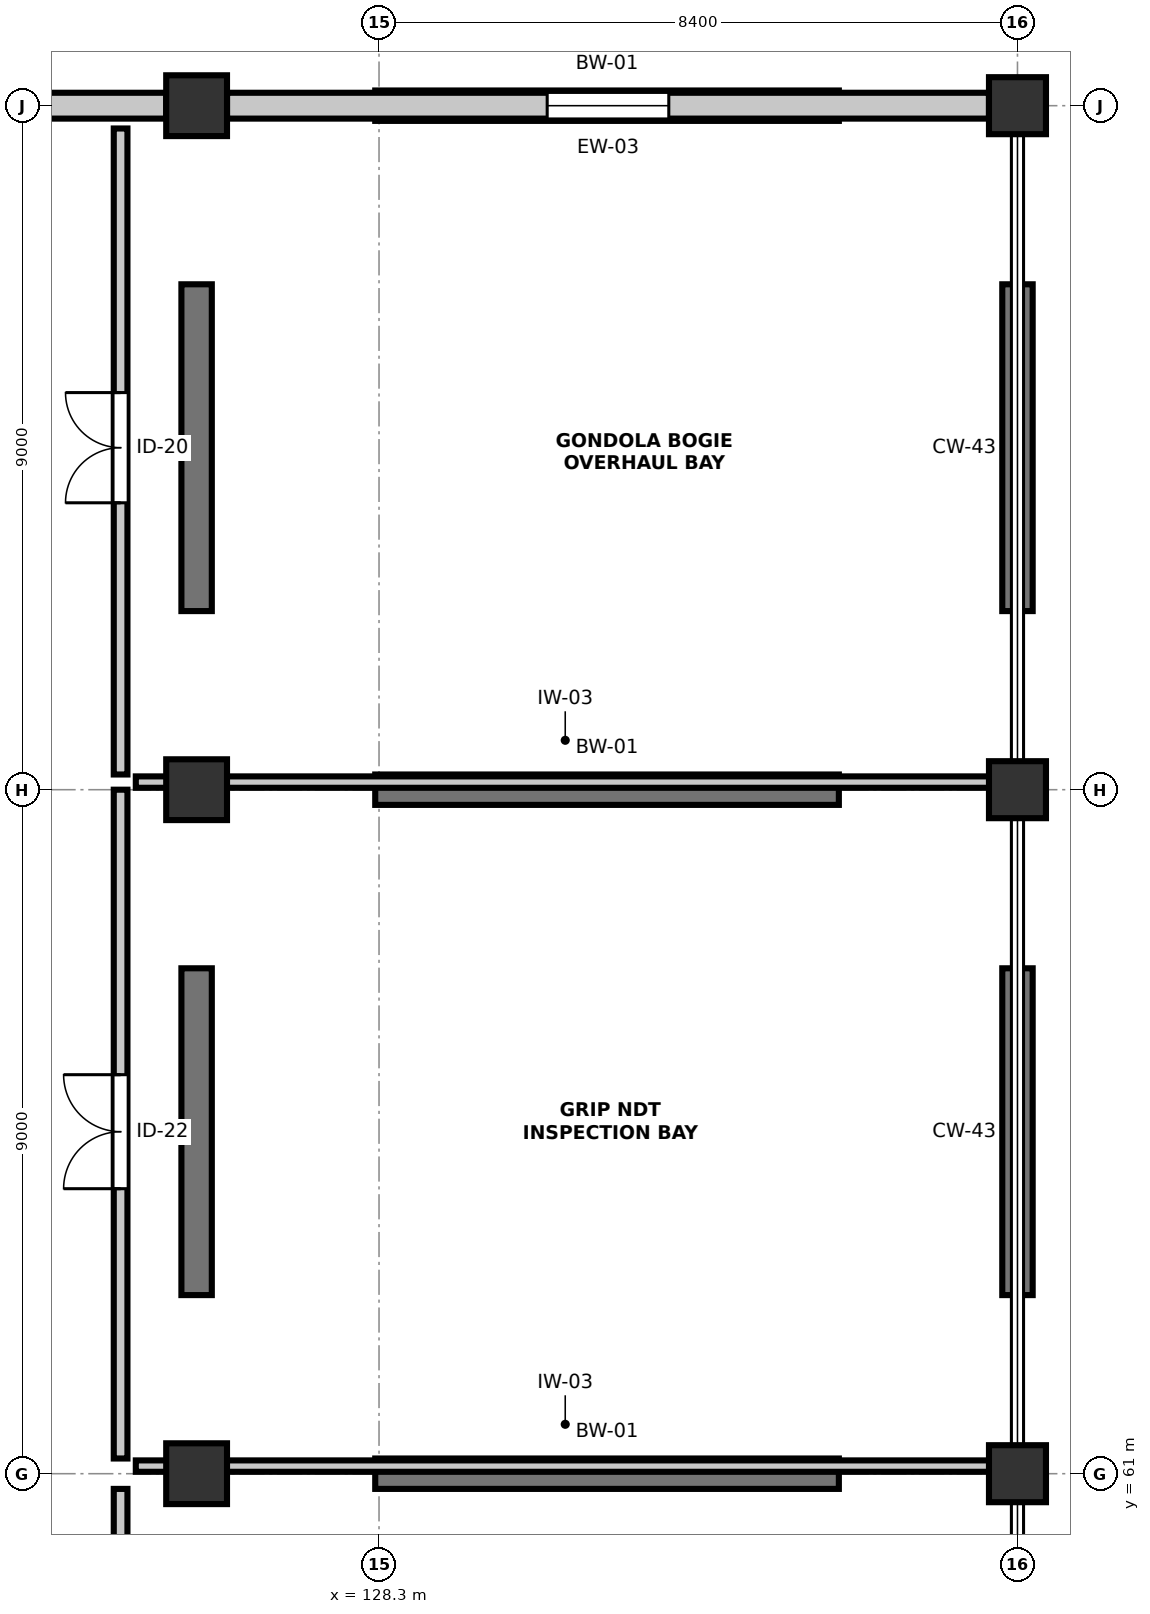
"""IFC4 building model, lengths in metres.
Left out: names, types, materials, properties, quantities, classifications, styles, units other than length and angle.
Written with IfcOpenShell. Run it as: python <this file> out.ifc"""

import sys

from ifc_helpers import new_model, si_unit, direction, frame, frame_2d, origin, origin_2d, place, context, subcontext, project, spatial, rectangle, extrude, element, fill, save


model = new_model("IFC4")
c1 = context("Model", 3, precision=1e-05, world=origin(), true_north=direction((0.0, 1.0)))
c2 = subcontext(c1, "Body", "Model", "MODEL_VIEW")
j1 = project(units=[si_unit("LENGTHUNIT", "METRE"), si_unit("PLANEANGLEUNIT", "RADIAN")], contexts=[c1])
p1 = place(None, origin())
s1 = spatial("IfcSite", under=j1, at=p1, CompositionType="ELEMENT")
p2 = place(p1, origin())
s2 = spatial("IfcBuilding", under=s1, at=p2, CompositionType="ELEMENT")
p3 = place(p2, frame((0.0, 0.0, 9.6)))
s3 = spatial("IfcBuildingStorey", under=s2, at=p3, CompositionType="ELEMENT", Elevation=9.6)
for number, where, z_axis, x_axis in (
    (1, (125.9, 61.0, 0.0), (0.0, 0.0, 1.0), (1.0, 0.0, 0.0)),
    (2, (125.9, 70.0, 0.0), (0.0, 0.0, 1.0), (1.0, 0.0, 0.0)),
    (3, (125.9, 79.0, 0.0), (0.0, 0.0, 1.0), (1.0, 0.0, 0.0)),
):
    element("IfcColumn", number, at=place(p3, frame(where, z_axis=z_axis, x_axis=x_axis)), inside=s3, PredefinedType="COLUMN", context=c2, shape_type="SweptSolid", body=[
        extrude(rectangle(XDim=0.8, YDim=0.8, at=origin_2d()), origin(), (0.0, 0.0, 1.0), 4.8),
    ])
for number, where, z_axis, x_axis in (
    (4, (136.7, 61.0, 0.0), (0.0, 0.0, 1.0), (1.0, 0.0, 0.0)),
    (5, (136.7, 70.0, 0.0), (0.0, 0.0, 1.0), (1.0, 0.0, 0.0)),
    (6, (136.7, 79.0, 0.0), (0.0, 0.0, 1.0), (1.0, 0.0, 0.0)),
):
    element("IfcColumn", number, at=place(p3, frame(where, z_axis=z_axis, x_axis=x_axis)), inside=s3, PredefinedType="COLUMN", context=c2, shape_type="SweptSolid", body=[
        extrude(rectangle(XDim=0.75, YDim=0.75, at=origin_2d()), origin(), (0.0, 0.0, 1.0), 4.8),
    ])
for number, where, z_axis, x_axis in (
    (7, (128.25, 61.0, -2.1), (0.0, 0.0, 1.0), (1.0, 0.0, 0.0)),
    (8, (128.25, 70.0, -2.1), (0.0, 0.0, 1.0), (1.0, 0.0, 0.0)),
    (9, (128.25, 79.0, -2.1), (0.0, 0.0, 1.0), (1.0, 0.0, 0.0)),
):
    element("IfcWall", number, at=place(p3, frame(where, z_axis=z_axis, x_axis=x_axis)), inside=s3, PredefinedType="SOLIDWALL", context=c2, shape_type="SweptSolid", body=[
        extrude(rectangle(XDim=6.1, YDim=0.4, at=frame_2d((3.05, 0.0))), origin(), (0.0, 0.0, 1.0), 1.85),
    ])
for number, where, z_axis, x_axis in (
    (10, (125.9, 63.35, -2.1), (0.0, 0.0, 1.0), (0.0, 1.0, 0.0)),
    (11, (125.9, 72.35, -2.1), (0.0, 0.0, 1.0), (0.0, 1.0, 0.0)),
    (12, (136.7, 63.35, -2.1), (0.0, 0.0, 1.0), (0.0, 1.0, 0.0)),
    (13, (136.7, 72.35, -2.1), (0.0, 0.0, 1.0), (0.0, 1.0, 0.0)),
):
    element("IfcWall", number, at=place(p3, frame(where, z_axis=z_axis, x_axis=x_axis)), inside=s3, PredefinedType="SOLIDWALL", context=c2, shape_type="SweptSolid", body=[
        extrude(rectangle(XDim=4.3, YDim=0.4, at=frame_2d((2.15, 0.0))), origin(), (0.0, 0.0, 1.0), 1.85),
    ])
p4 = place(p2, frame((0.0, 0.0, 14.4)))
s4 = spatial("IfcBuildingStorey", under=s2, at=p4, CompositionType="ELEMENT", Elevation=14.4)
p5 = place(p4, frame((129.4, 79.655, -7.2), z_axis=(0.0, 0.0, 1.0), x_axis=(1.0, 0.0, 0.0)))
e14 = element("IfcWall", 14, at=p5, inside=s4, PredefinedType="SOLIDWALL", context=c2, shape_type="SweptSolid", body=[
    extrude(rectangle(XDim=6.2, YDim=0.4, at=frame_2d((3.1, 0.0))), origin(), (0.0, 0.0, 1.0), 6.98),
])
p6 = place(p3, frame((125.5, 79.0, 0.0), z_axis=(0.0, 0.0, 1.0), x_axis=(-1.0, 0.0, 0.0)))
e15 = element("IfcWall", 15, at=p6, inside=s3, PredefinedType="STANDARD", context=c2, shape_type="SweptSolid", body=[
    extrude(rectangle(XDim=10.0, YDim=0.34, at=frame_2d((5.0, 0.0))), origin(), (0.0, 0.0, 1.0), 3.805),
])
p7 = place(p6, frame((4.2, 0.0, 0.95)))
e16 = element("IfcOpeningElement", 16, at=p7, cuts=e15, PredefinedType="OPENING", context=c2, shape_type="SweptSolid", body=[
    extrude(rectangle(XDim=1.6, YDim=1.95, at=frame_2d((0.8, 0.975))), frame((0.0, 0.18, 0.0), z_axis=(0.0, -1.0, 0.0), x_axis=(1.0, 0.0, 0.0)), (0.0, 0.0, 1.0), 0.36),
])
p8 = place(p3, frame((136.325, 79.0, 0.0), z_axis=(0.0, 0.0, 1.0), x_axis=(-1.0, 0.0, 0.0)))
e17 = element("IfcWall", 17, at=p8, inside=s3, PredefinedType="STANDARD", context=c2, shape_type="SweptSolid", body=[
    extrude(rectangle(XDim=10.025, YDim=0.34, at=frame_2d((5.012, 0.0))), origin(), (0.0, 0.0, 1.0), 3.805),
])
p9 = place(p8, frame((4.212, 0.0, 0.95)))
e18 = element("IfcOpeningElement", 18, at=p9, cuts=e17, PredefinedType="OPENING", context=c2, shape_type="SweptSolid", body=[
    extrude(rectangle(XDim=1.6, YDim=2.15, at=frame_2d((0.8, 1.075))), frame((0.0, 0.18, 0.0), z_axis=(0.0, -1.0, 0.0), x_axis=(1.0, 0.0, 0.0)), (0.0, 0.0, 1.0), 0.36),
])
p10 = place(p3, frame((124.9, 43.3, 0.0), z_axis=(0.0, 0.0, 1.0), x_axis=(0.0, 1.0, 0.0)))
e19 = element("IfcWall", 19, at=p10, inside=s3, PredefinedType="PARTITIONING", context=c2, shape_type="SweptSolid", body=[
    extrude(rectangle(XDim=17.5, YDim=0.18, at=frame_2d((8.75, 0.0))), origin(), (0.0, 0.0, 1.0), 3.805),
])
p11 = place(p10, frame((3.3, 0.0, 0.0)))
e20 = element("IfcOpeningElement", 20, at=p11, cuts=e19, PredefinedType="OPENING", context=c2, shape_type="SweptSolid", body=[
    extrude(rectangle(XDim=1.8, YDim=2.34, at=frame_2d((0.9, 1.17))), frame((0.0, 0.1, 0.0), z_axis=(0.0, -1.0, 0.0), x_axis=(1.0, 0.0, 0.0)), (0.0, 0.0, 1.0), 0.2),
])
p12 = place(p3, frame((124.9, 61.2, 0.0), z_axis=(0.0, 0.0, 1.0), x_axis=(0.0, 1.0, 0.0)))
e21 = element("IfcWall", 21, at=p12, inside=s3, PredefinedType="PARTITIONING", context=c2, shape_type="SweptSolid", body=[
    extrude(rectangle(XDim=8.8, YDim=0.18, at=frame_2d((4.4, 0.0))), origin(), (0.0, 0.0, 1.0), 3.805),
])
p13 = place(p12, frame((3.55, 0.0, 0.0)))
e22 = element("IfcOpeningElement", 22, at=p13, cuts=e21, PredefinedType="OPENING", context=c2, shape_type="SweptSolid", body=[
    extrude(rectangle(XDim=1.5, YDim=2.26, at=frame_2d((0.75, 1.13))), frame((0.0, 0.1, 0.0), z_axis=(0.0, -1.0, 0.0), x_axis=(1.0, 0.0, 0.0)), (0.0, 0.0, 1.0), 0.2),
])
p14 = place(p3, frame((125.1, 61.1, 0.0), z_axis=(0.0, 0.0, 1.0), x_axis=(1.0, 0.0, 0.0)))
e23 = element("IfcWall", 23, at=p14, inside=s3, PredefinedType="PARTITIONING", context=c2, shape_type="SweptSolid", body=[
    extrude(rectangle(XDim=11.3, YDim=0.15, at=frame_2d((5.65, 0.0))), origin(), (0.0, 0.0, 1.0), 3.805),
])
p15 = place(p3, frame((124.9, 70.2, 0.0), z_axis=(0.0, 0.0, 1.0), x_axis=(0.0, 1.0, 0.0)))
e24 = element("IfcWall", 24, at=p15, inside=s3, PredefinedType="PARTITIONING", context=c2, shape_type="SweptSolid", body=[
    extrude(rectangle(XDim=8.5, YDim=0.18, at=frame_2d((4.25, 0.0))), origin(), (0.0, 0.0, 1.0), 4.505),
])
p16 = place(p15, frame((3.575, 0.0, 0.0)))
e25 = element("IfcOpeningElement", 25, at=p16, cuts=e24, PredefinedType="OPENING", context=c2, shape_type="SweptSolid", body=[
    extrude(rectangle(XDim=1.45, YDim=2.24, at=frame_2d((0.725, 1.12))), frame((0.0, 0.1, 0.0), z_axis=(0.0, -1.0, 0.0), x_axis=(1.0, 0.0, 0.0)), (0.0, 0.0, 1.0), 0.2),
])
p17 = place(p3, frame((125.1, 70.1, 0.0), z_axis=(0.0, 0.0, 1.0), x_axis=(1.0, 0.0, 0.0)))
e26 = element("IfcWall", 26, at=p17, inside=s3, PredefinedType="PARTITIONING", context=c2, shape_type="SweptSolid", body=[
    extrude(rectangle(XDim=11.3, YDim=0.15, at=frame_2d((5.65, 0.0))), origin(), (0.0, 0.0, 1.0), 3.805),
])
p18 = place(p9, origin())
e27 = element("IfcWindow", 27, at=p18, inside=s3, PartitioningType="SINGLE_PANEL", PredefinedType="WINDOW", context=c2, shape_type="SweptSolid", body=[
    extrude(rectangle(XDim=1.6, YDim=2.15, at=frame_2d((0.8, 1.075))), frame((0.0, 0.03, 0.0), z_axis=(0.0, -1.0, 0.0), x_axis=(1.0, 0.0, 0.0)), (0.0, 0.0, 1.0), 0.06),
])
fill(e18, e27)
p19 = place(p13, origin())
e28 = element("IfcDoor", 28, at=p19, inside=s3, OperationType="DOUBLE_DOOR_SINGLE_SWING", PredefinedType="DOOR", context=c2, shape_type="SweptSolid", body=[
    extrude(rectangle(XDim=1.5, YDim=2.26, at=frame_2d((0.75, 1.13))), frame((0.0, 0.025, 0.0), z_axis=(0.0, -1.0, 0.0), x_axis=(1.0, 0.0, 0.0)), (0.0, 0.0, 1.0), 0.05),
])
fill(e22, e28)
p20 = place(p16, origin())
e29 = element("IfcDoor", 29, at=p20, inside=s3, OperationType="DOUBLE_DOOR_SINGLE_SWING", PredefinedType="DOOR", context=c2, shape_type="SweptSolid", body=[
    extrude(rectangle(XDim=1.45, YDim=2.24, at=frame_2d((0.725, 1.12))), frame((0.0, 0.025, 0.0), z_axis=(0.0, -1.0, 0.0), x_axis=(1.0, 0.0, 0.0)), (0.0, 0.0, 1.0), 0.05),
])
fill(e25, e29)
save(model, sys.argv[1])
